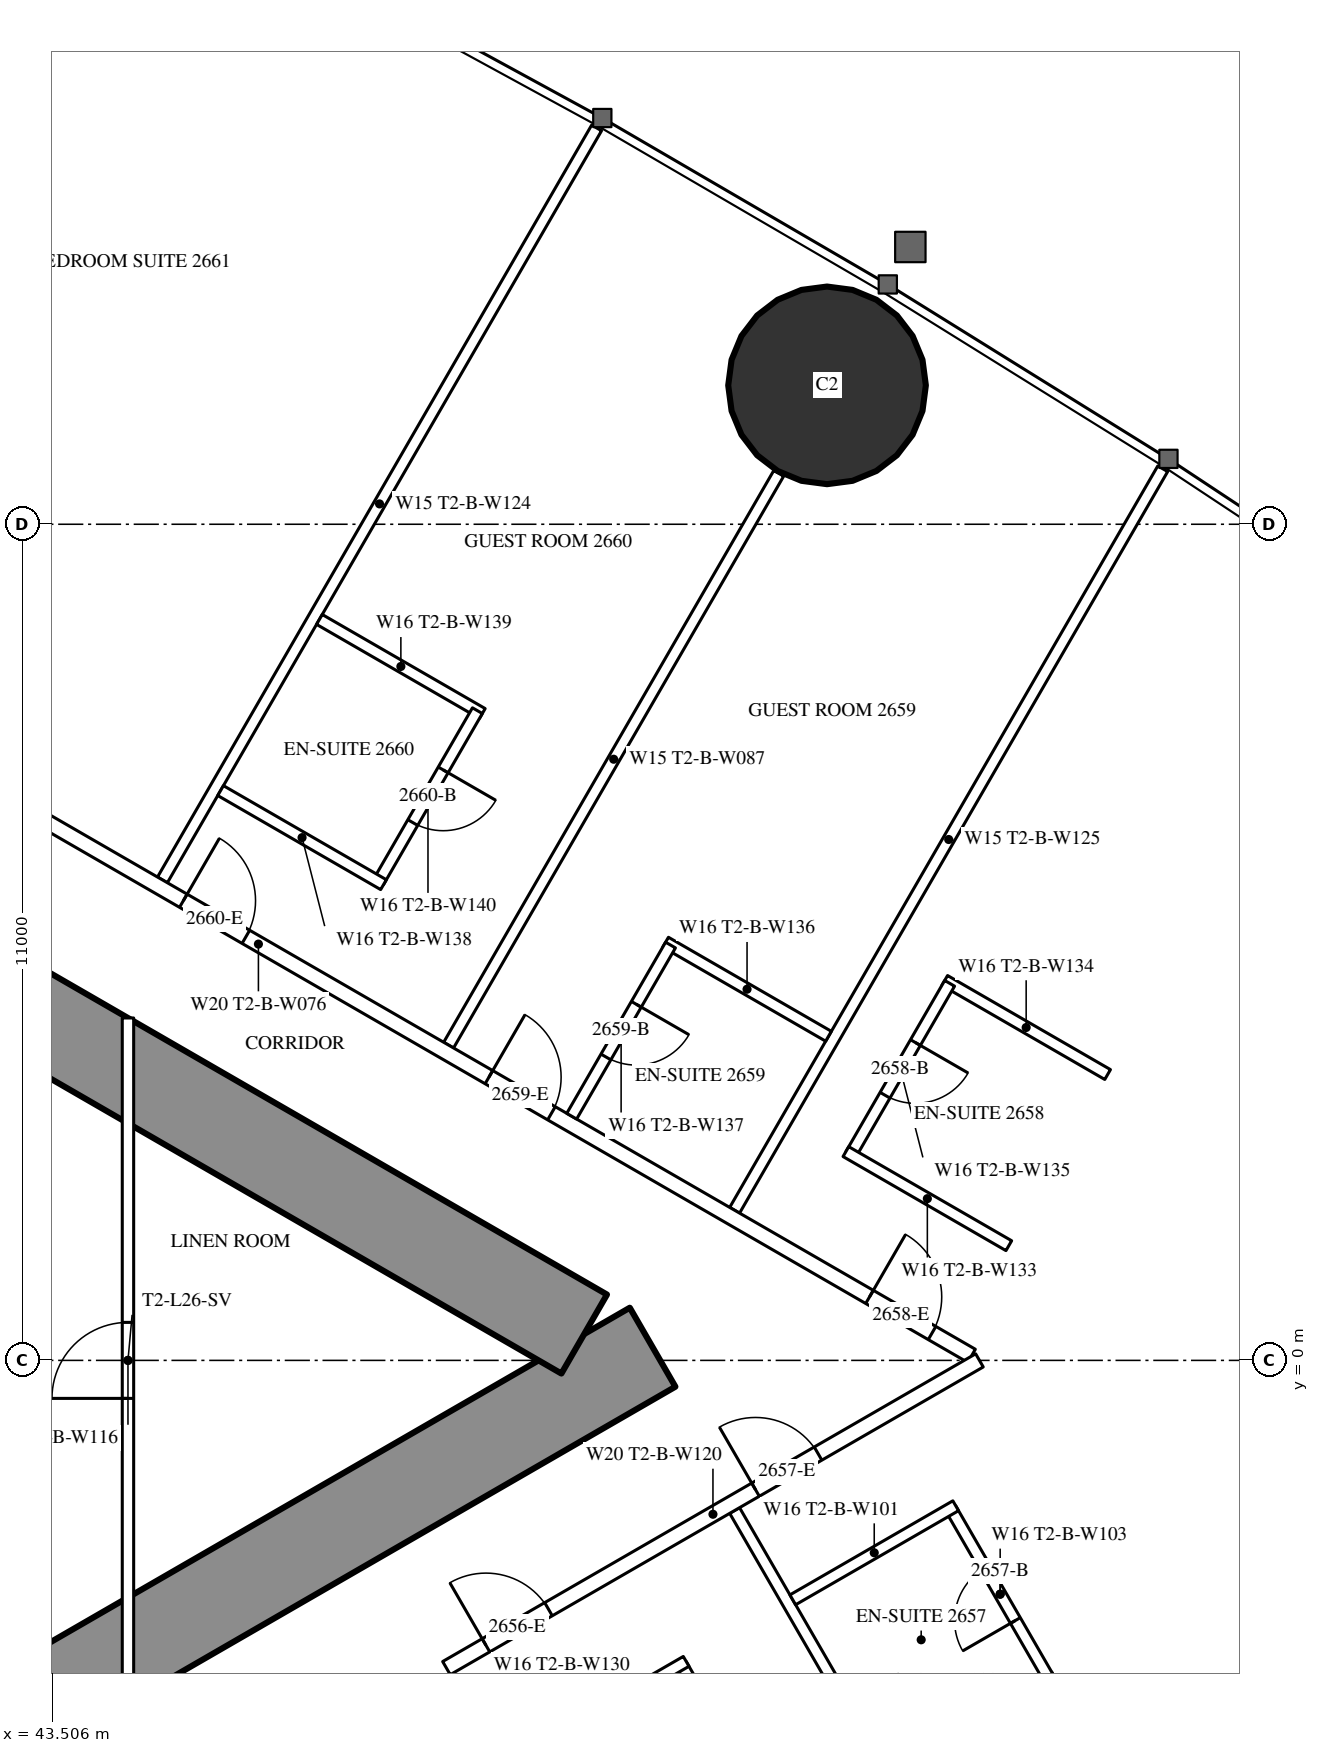
"""IFC4 building model, lengths in metres.
Left out: names, types, materials, properties, quantities, classifications, styles, units other than length and angle.
Written with IfcOpenShell. Run it as: python <this file> out.ifc"""

import sys

from ifc_helpers import new_model, si_unit, direction, frame, frame_2d, origin, origin_2d, place, context, subcontext, project, spatial, rectangle, hollow_circle, extrude, element, fill, save


model = new_model("IFC4")
c1 = context("Model", 3, precision=1e-05, world=origin(), true_north=direction((0.0, 1.0)))
c2 = subcontext(c1, "Body", "Model", "MODEL_VIEW")
j1 = project(units=[si_unit("LENGTHUNIT", "METRE"), si_unit("PLANEANGLEUNIT", "RADIAN")], contexts=[c1])
p1 = place(None, origin())
s1 = spatial("IfcSite", under=j1, at=p1, CompositionType="ELEMENT")
p2 = place(p1, origin())
s2 = spatial("IfcBuilding", under=s1, at=p2, CompositionType="ELEMENT")
p3 = place(p2, frame((0.0, 0.0, 101.1)))
s3 = spatial("IfcBuildingStorey", under=s2, at=p3, CompositionType="ELEMENT", Elevation=101.1)
p4 = place(p3, frame((53.697, 12.827, 0.0), z_axis=(0.0, 0.0, 1.0), x_axis=(1.0, 0.0, 0.0)))
e1 = element("IfcColumn", 1, at=p4, inside=s3, PredefinedType="COLUMN", context=c2, shape_type="SweptSolid", body=[
    extrude(hollow_circle(Radius=1.3, WallThickness=0.1, at=origin_2d()), origin(), (0.0, 0.0, 1.0), 3.5),
])
p5 = place(p3, frame((27.2, -13.8, 0.0), z_axis=(0.0, 0.0, 1.0), x_axis=(0.866027159892, 0.499996958321, 0.0)))
e2 = element("IfcWall", 2, at=p5, inside=s3, PredefinedType="SHEAR", context=c2, shape_type="SweptSolid", body=[
    extrude(rectangle(XDim=27.947, YDim=1.2, at=frame_2d((13.973, 0.0))), origin(), (0.0, 0.0, 1.0), 3.5),
])
p6 = place(p5, frame((4.6, 0.0, 0.0)))
e3 = element("IfcOpeningElement", 3, at=p6, cuts=e2, PredefinedType="OPENING", context=c2, shape_type="SweptSolid", body=[
    extrude(rectangle(XDim=1.0, YDim=2.2, at=frame_2d((0.5, 1.1))), frame((0.0, 0.61, 0.0), z_axis=(0.0, -1.0, 0.0), x_axis=(1.0, 0.0, 0.0)), (0.0, 0.0, 1.0), 1.22),
])
p7 = place(p5, frame((13.395, 0.0, 0.0)))
e4 = element("IfcOpeningElement", 4, at=p7, cuts=e2, PredefinedType="OPENING", context=c2, shape_type="SweptSolid", body=[
    extrude(rectangle(XDim=1.8, YDim=2.2, at=frame_2d((0.9, 1.1))), frame((0.0, 0.61, 0.0), z_axis=(0.0, -1.0, 0.0), x_axis=(1.0, 0.0, 0.0)), (0.0, 0.0, 1.0), 1.22),
])
p8 = place(p3, frame((27.2, 13.8, 0.0), z_axis=(0.0, 0.0, 1.0), x_axis=(0.866024515034, -0.500001539357, 0.0)))
e5 = element("IfcWall", 5, at=p8, inside=s3, PredefinedType="SHEAR", context=c2, shape_type="SweptSolid", body=[
    extrude(rectangle(XDim=26.907, YDim=1.2, at=frame_2d((13.454, 0.0))), origin(), (0.0, 0.0, 1.0), 3.5),
])
p9 = place(p8, frame((4.6, 0.0, 0.0)))
e6 = element("IfcOpeningElement", 6, at=p9, cuts=e5, PredefinedType="OPENING", context=c2, shape_type="SweptSolid", body=[
    extrude(rectangle(XDim=1.0, YDim=2.2, at=frame_2d((0.5, 1.1))), frame((0.0, 0.61, 0.0), z_axis=(0.0, -1.0, 0.0), x_axis=(1.0, 0.0, 0.0)), (0.0, 0.0, 1.0), 1.22),
])
p10 = place(p8, frame((13.395, 0.0, 0.0)))
e7 = element("IfcOpeningElement", 7, at=p10, cuts=e5, PredefinedType="OPENING", context=c2, shape_type="SweptSolid", body=[
    extrude(rectangle(XDim=1.8, YDim=2.2, at=frame_2d((0.9, 1.1))), frame((0.0, 0.61, 0.0), z_axis=(0.0, -1.0, 0.0), x_axis=(1.0, 0.0, 0.0)), (0.0, 0.0, 1.0), 1.22),
])
p11 = place(p3, frame((48.719, -4.147, 0.0), z_axis=(0.0, 0.0, 1.0), x_axis=(0.499990498062, -0.866030889661, 0.0)))
e8 = element("IfcWall", 8, at=p11, inside=s3, PredefinedType="PARTITIONING", context=c2, shape_type="SweptSolid", body=[
    extrude(rectangle(XDim=11.406, YDim=0.15, at=frame_2d((5.703, 0.0))), origin(), (0.0, 0.0, 1.0), 3.25),
])
p12 = place(p3, frame((52.481, -1.975, 0.0), z_axis=(0.0, 0.0, 1.0), x_axis=(0.500003867771, -0.866023170714, 0.0)))
e9 = element("IfcWall", 9, at=p12, inside=s3, PredefinedType="PARTITIONING", context=c2, shape_type="SweptSolid", body=[
    extrude(rectangle(XDim=11.265, YDim=0.15, at=frame_2d((5.632, 0.0))), origin(), (0.0, 0.0, 1.0), 3.25),
])
p13 = place(p3, frame((44.954, 6.321, 0.0), z_axis=(0.0, 0.0, 1.0), x_axis=(0.500009815811, 0.866019736549, 0.0)))
e10 = element("IfcWall", 10, at=p13, inside=s3, PredefinedType="PARTITIONING", context=c2, shape_type="SweptSolid", body=[
    extrude(rectangle(XDim=11.424, YDim=0.15, at=frame_2d((5.712, 0.0))), origin(), (0.0, 0.0, 1.0), 3.25),
])
p14 = place(p3, frame((48.719, 4.147, 0.0), z_axis=(0.0, 0.0, 1.0), x_axis=(0.499993328235, 0.866029255696, 0.0)))
e11 = element("IfcWall", 11, at=p14, inside=s3, PredefinedType="PARTITIONING", context=c2, shape_type="SweptSolid", body=[
    extrude(rectangle(XDim=8.686, YDim=0.15, at=frame_2d((4.343, 0.0))), origin(), (0.0, 0.0, 1.0), 2.2),
])
p15 = place(p3, frame((52.481, 1.975, 0.0), z_axis=(0.0, 0.0, 1.0), x_axis=(0.500003867771, 0.866023170714, 0.0)))
e12 = element("IfcWall", 12, at=p15, inside=s3, PredefinedType="PARTITIONING", context=c2, shape_type="SweptSolid", body=[
    extrude(rectangle(XDim=11.265, YDim=0.15, at=frame_2d((5.632, 0.0))), origin(), (0.0, 0.0, 1.0), 3.25),
])
p16 = place(p3, frame((36.834, 10.894, 0.0), z_axis=(0.0, 0.0, 1.0), x_axis=(0.866028157229, -0.499995230863, 0.0)))
e13 = element("IfcWall", 13, at=p16, inside=s3, PredefinedType="PARTITIONING", context=c2, shape_type="SweptSolid", body=[
    extrude(rectangle(XDim=21.667, YDim=0.2, at=frame_2d((10.833, 0.0))), origin(), (0.0, 0.0, 1.0), 3.25),
])
p17 = place(p16, frame((20.117, 0.0, 0.0)))
e14 = element("IfcOpeningElement", 14, at=p17, cuts=e13, PredefinedType="OPENING", context=c2, shape_type="SweptSolid", body=[
    extrude(rectangle(XDim=0.95, YDim=2.2, at=frame_2d((0.475, 1.1))), frame((0.0, 0.11, 0.0), z_axis=(0.0, -1.0, 0.0), x_axis=(1.0, 0.0, 0.0)), (0.0, 0.0, 1.0), 0.22),
])
p18 = place(p16, frame((14.335, 0.0, 0.0)))
e15 = element("IfcOpeningElement", 15, at=p18, cuts=e13, PredefinedType="OPENING", context=c2, shape_type="SweptSolid", body=[
    extrude(rectangle(XDim=0.95, YDim=2.2, at=frame_2d((0.475, 1.1))), frame((0.0, 0.11, 0.0), z_axis=(0.0, -1.0, 0.0), x_axis=(1.0, 0.0, 0.0)), (0.0, 0.0, 1.0), 0.22),
])
p19 = place(p16, frame((9.693, 0.0, 0.0)))
e16 = element("IfcOpeningElement", 16, at=p19, cuts=e13, PredefinedType="OPENING", context=c2, shape_type="SweptSolid", body=[
    extrude(rectangle(XDim=0.95, YDim=2.2, at=frame_2d((0.475, 1.1))), frame((0.0, 0.11, 0.0), z_axis=(0.0, -1.0, 0.0), x_axis=(1.0, 0.0, 0.0)), (0.0, 0.0, 1.0), 0.22),
])
p20 = place(p16, frame((2.95, 0.0, 0.0)))
e17 = element("IfcOpeningElement", 17, at=p20, cuts=e13, PredefinedType="OPENING", context=c2, shape_type="SweptSolid", body=[
    extrude(rectangle(XDim=0.95, YDim=2.2, at=frame_2d((0.475, 1.1))), frame((0.0, 0.11, 0.0), z_axis=(0.0, -1.0, 0.0), x_axis=(1.0, 0.0, 0.0)), (0.0, 0.0, 1.0), 0.22),
])
p21 = place(p3, frame((48.69, -4.048, 0.0), z_axis=(0.0, 0.0, 1.0), x_axis=(0.866026410209, 0.499998256818, 0.0)))
e18 = element("IfcWall", 18, at=p21, inside=s3, PredefinedType="PARTITIONING", context=c2, shape_type="SweptSolid", body=[
    extrude(rectangle(XDim=8.097, YDim=0.2, at=frame_2d((4.048, 0.0))), origin(), (0.0, 0.0, 1.0), 3.25),
])
p22 = place(p21, frame((0.6, 0.0, 0.0)))
e19 = element("IfcOpeningElement", 19, at=p22, cuts=e18, PredefinedType="OPENING", context=c2, shape_type="SweptSolid", body=[
    extrude(rectangle(XDim=0.95, YDim=2.2, at=frame_2d((0.475, 1.1))), frame((0.0, 0.11, 0.0), z_axis=(0.0, -1.0, 0.0), x_axis=(1.0, 0.0, 0.0)), (0.0, 0.0, 1.0), 0.22),
])
p23 = place(p21, frame((4.695, 0.0, 0.0)))
e20 = element("IfcOpeningElement", 20, at=p23, cuts=e18, PredefinedType="OPENING", context=c2, shape_type="SweptSolid", body=[
    extrude(rectangle(XDim=0.95, YDim=2.2, at=frame_2d((0.475, 1.1))), frame((0.0, 0.11, 0.0), z_axis=(0.0, -1.0, 0.0), x_axis=(1.0, 0.0, 0.0)), (0.0, 0.0, 1.0), 0.22),
])
p24 = place(p3, frame((51.778, -3.998, 0.0), z_axis=(0.0, 0.0, 1.0), x_axis=(0.500047596559, -0.865997922154, 0.0)))
e21 = element("IfcWall", 21, at=p24, inside=s3, PredefinedType="PARTITIONING", context=c2, shape_type="SweptSolid", body=[
    extrude(rectangle(XDim=2.6, YDim=0.15, at=frame_2d((1.3, 0.0))), origin(), (0.0, 0.0, 1.0), 3.25),
])
p25 = place(p24, frame((0.9, 0.0, 0.0)))
e22 = element("IfcOpeningElement", 22, at=p25, cuts=e21, PredefinedType="OPENING", context=c2, shape_type="SweptSolid", body=[
    extrude(rectangle(XDim=0.8, YDim=2.2, at=frame_2d((0.4, 1.1))), frame((0.0, 0.085, 0.0), z_axis=(0.0, -1.0, 0.0), x_axis=(1.0, 0.0, 0.0)), (0.0, 0.0, 1.0), 0.17),
])
for number, where, z_axis, x_axis in (
    (23, (49.7, -5.198, 0.0), (0.0, 0.0, 1.0), (0.866, 0.5, 0.0)),
    (24, (54.546, -5.402, 0.0), (0.0, 0.0, 1.0), (0.866, 0.5, 0.0)),
):
    element("IfcWall", number, at=place(p3, frame(where, z_axis=z_axis, x_axis=x_axis)), inside=s3, PredefinedType="PARTITIONING", context=c2, shape_type="SweptSolid", body=[
        extrude(rectangle(XDim=2.475, YDim=0.15, at=frame_2d((1.237, 0.0))), origin(), (0.0, 0.0, 1.0), 3.25),
    ])
p26 = place(p3, frame((55.325, -1.95, 0.0), z_axis=(0.0, 0.0, 1.0), x_axis=(0.500006934395, -0.866021400173, 0.0)))
e25 = element("IfcWall", 25, at=p26, inside=s3, PredefinedType="PARTITIONING", context=c2, shape_type="SweptSolid", body=[
    extrude(rectangle(XDim=2.6, YDim=0.15, at=frame_2d((1.3, 0.0))), origin(), (0.0, 0.0, 1.0), 3.25),
])
p27 = place(p26, frame((0.9, 0.0, 0.0)))
e26 = element("IfcOpeningElement", 26, at=p27, cuts=e25, PredefinedType="OPENING", context=c2, shape_type="SweptSolid", body=[
    extrude(rectangle(XDim=0.8, YDim=2.2, at=frame_2d((0.4, 1.1))), frame((0.0, 0.085, 0.0), z_axis=(0.0, -1.0, 0.0), x_axis=(1.0, 0.0, 0.0)), (0.0, 0.0, 1.0), 0.17),
])
for number, where, z_axis, x_axis in (
    (27, (53.246, -3.15, 0.0), (0.0, 0.0, 1.0), (0.866, 0.5, 0.0)),
    (28, (55.245, 4.998, 0.0), (0.0, 0.0, 1.0), (0.866, -0.5, 0.0)),
):
    element("IfcWall", number, at=place(p3, frame(where, z_axis=z_axis, x_axis=x_axis)), inside=s3, PredefinedType="PARTITIONING", context=c2, shape_type="SweptSolid", body=[
        extrude(rectangle(XDim=2.475, YDim=0.15, at=frame_2d((1.237, 0.0))), origin(), (0.0, 0.0, 1.0), 3.25),
    ])
p28 = place(p3, frame((54.01, 2.709, 0.0), z_axis=(0.0, 0.0, 1.0), x_axis=(0.500006934395, 0.866021400173, 0.0)))
e29 = element("IfcWall", 29, at=p28, inside=s3, PredefinedType="PARTITIONING", context=c2, shape_type="SweptSolid", body=[
    extrude(rectangle(XDim=2.6, YDim=0.15, at=frame_2d((1.3, 0.0))), origin(), (0.0, 0.0, 1.0), 3.25),
])
p29 = place(p28, frame((0.9, 0.0, 0.0)))
e30 = element("IfcOpeningElement", 30, at=p29, cuts=e29, PredefinedType="OPENING", context=c2, shape_type="SweptSolid", body=[
    extrude(rectangle(XDim=0.8, YDim=2.2, at=frame_2d((0.4, 1.1))), frame((0.0, 0.085, 0.0), z_axis=(0.0, -1.0, 0.0), x_axis=(1.0, 0.0, 0.0)), (0.0, 0.0, 1.0), 0.17),
])
p30 = place(p3, frame((53.945, 2.747, 0.0), z_axis=(0.0, 0.0, 1.0), x_axis=(0.866031185235, -0.4999899861, 0.0)))
e31 = element("IfcWall", 31, at=p30, inside=s3, PredefinedType="PARTITIONING", context=c2, shape_type="SweptSolid", body=[
    extrude(rectangle(XDim=2.475, YDim=0.15, at=frame_2d((1.238, 0.0))), origin(), (0.0, 0.0, 1.0), 3.25),
])
p31 = place(p3, frame((51.573, 5.502, 0.0), z_axis=(0.0, 0.0, 1.0), x_axis=(0.866006523861, -0.500032699561, 0.0)))
e32 = element("IfcWall", 32, at=p31, inside=s3, PredefinedType="PARTITIONING", context=c2, shape_type="SweptSolid", body=[
    extrude(rectangle(XDim=2.475, YDim=0.15, at=frame_2d((1.237, 0.0))), origin(), (0.0, 0.0, 1.0), 3.25),
])
p32 = place(p3, frame((50.338, 3.213, 0.0), z_axis=(0.0, 0.0, 1.0), x_axis=(0.500047596559, 0.865997922154, 0.0)))
e33 = element("IfcWall", 33, at=p32, inside=s3, PredefinedType="PARTITIONING", context=c2, shape_type="SweptSolid", body=[
    extrude(rectangle(XDim=2.6, YDim=0.15, at=frame_2d((1.3, 0.0))), origin(), (0.0, 0.0, 1.0), 3.25),
])
p33 = place(p32, frame((0.9, 0.0, 0.0)))
e34 = element("IfcOpeningElement", 34, at=p33, cuts=e33, PredefinedType="OPENING", context=c2, shape_type="SweptSolid", body=[
    extrude(rectangle(XDim=0.8, YDim=2.2, at=frame_2d((0.4, 1.1))), frame((0.0, 0.085, 0.0), z_axis=(0.0, -1.0, 0.0), x_axis=(1.0, 0.0, 0.0)), (0.0, 0.0, 1.0), 0.17),
])
p34 = place(p3, frame((47.019, 9.748, 0.0), z_axis=(0.0, 0.0, 1.0), x_axis=(0.866006523861, -0.500032699561, 0.0)))
e35 = element("IfcWall", 35, at=p34, inside=s3, PredefinedType="PARTITIONING", context=c2, shape_type="SweptSolid", body=[
    extrude(rectangle(XDim=2.475, YDim=0.15, at=frame_2d((1.237, 0.0))), origin(), (0.0, 0.0, 1.0), 3.25),
])
p35 = place(p3, frame((47.797, 6.296, 0.0), z_axis=(0.0, 0.0, 1.0), x_axis=(0.499936506574, 0.866062058628, 0.0)))
e36 = element("IfcWall", 36, at=p35, inside=s3, PredefinedType="PARTITIONING", context=c2, shape_type="SweptSolid", body=[
    extrude(rectangle(XDim=2.6, YDim=0.15, at=frame_2d((1.3, 0.0))), origin(), (0.0, 0.0, 1.0), 3.25),
])
p36 = place(p35, frame((0.9, 0.0, 0.0)))
e37 = element("IfcOpeningElement", 37, at=p36, cuts=e36, PredefinedType="OPENING", context=c2, shape_type="SweptSolid", body=[
    extrude(rectangle(XDim=0.8, YDim=2.2, at=frame_2d((0.4, 1.1))), frame((0.0, 0.085, 0.0), z_axis=(0.0, -1.0, 0.0), x_axis=(1.0, 0.0, 0.0)), (0.0, 0.0, 1.0), 0.17),
])
p37 = place(p3, frame((45.719, 7.496, 0.0), z_axis=(0.0, 0.0, 1.0), x_axis=(0.866031185235, -0.4999899861, 0.0)))
e38 = element("IfcWall", 38, at=p37, inside=s3, PredefinedType="PARTITIONING", context=c2, shape_type="SweptSolid", body=[
    extrude(rectangle(XDim=2.475, YDim=0.15, at=frame_2d((1.238, 0.0))), origin(), (0.0, 0.0, 1.0), 3.25),
])
p38 = place(p3, frame((44.5, -4.505, 0.0), z_axis=(0.0, 0.0, 1.0), x_axis=(0.0, 1.0, 0.0)))
e39 = element("IfcWall", 39, at=p38, inside=s3, PredefinedType="PARTITIONING", context=c2, shape_type="SweptSolid", body=[
    extrude(rectangle(XDim=9.009, YDim=0.15, at=frame_2d((4.505, 0.0))), origin(), (0.0, 0.0, 1.0), 2.45),
])
p39 = place(p38, frame((4.005, 0.0, 0.0)))
e40 = element("IfcOpeningElement", 40, at=p39, cuts=e39, PredefinedType="OPENING", context=c2, shape_type="SweptSolid", body=[
    extrude(rectangle(XDim=1.0, YDim=2.2, at=frame_2d((0.5, 1.1))), frame((0.0, 0.085, 0.0), z_axis=(0.0, -1.0, 0.0), x_axis=(1.0, 0.0, 0.0)), (0.0, 0.0, 1.0), 0.17),
])
p40 = place(p22, origin())
e41 = element("IfcDoor", 41, at=p40, inside=s3, OperationType="SINGLE_SWING_LEFT", PredefinedType="DOOR", context=c2, shape_type="SweptSolid", body=[
    extrude(rectangle(XDim=0.95, YDim=2.2, at=frame_2d((0.475, 1.1))), frame((0.0, 0.025, 0.0), z_axis=(0.0, -1.0, 0.0), x_axis=(1.0, 0.0, 0.0)), (0.0, 0.0, 1.0), 0.05),
])
fill(e19, e41)
p41 = place(p27, origin())
e42 = element("IfcDoor", 42, at=p41, inside=s3, OperationType="SINGLE_SWING_RIGHT", PredefinedType="DOOR", context=c2, shape_type="SweptSolid", body=[
    extrude(rectangle(XDim=0.8, YDim=2.2, at=frame_2d((0.4, 1.1))), frame((0.0, 0.025, 0.0), z_axis=(0.0, -1.0, 0.0), x_axis=(1.0, 0.0, 0.0)), (0.0, 0.0, 1.0), 0.05),
])
fill(e26, e42)
p42 = place(p23, origin())
e43 = element("IfcDoor", 43, at=p42, inside=s3, OperationType="SINGLE_SWING_LEFT", PredefinedType="DOOR", context=c2, shape_type="SweptSolid", body=[
    extrude(rectangle(XDim=0.95, YDim=2.2, at=frame_2d((0.475, 1.1))), frame((0.0, 0.025, 0.0), z_axis=(0.0, -1.0, 0.0), x_axis=(1.0, 0.0, 0.0)), (0.0, 0.0, 1.0), 0.05),
])
fill(e20, e43)
p43 = place(p29, origin())
e44 = element("IfcDoor", 44, at=p43, inside=s3, OperationType="SINGLE_SWING_RIGHT", PredefinedType="DOOR", context=c2, shape_type="SweptSolid", body=[
    extrude(rectangle(XDim=0.8, YDim=2.2, at=frame_2d((0.4, 1.1))), frame((0.0, 0.025, 0.0), z_axis=(0.0, -1.0, 0.0), x_axis=(1.0, 0.0, 0.0)), (0.0, 0.0, 1.0), 0.05),
])
fill(e30, e44)
p44 = place(p17, origin())
e45 = element("IfcDoor", 45, at=p44, inside=s3, OperationType="SINGLE_SWING_LEFT", PredefinedType="DOOR", context=c2, shape_type="SweptSolid", body=[
    extrude(rectangle(XDim=0.95, YDim=2.2, at=frame_2d((0.475, 1.1))), frame((0.0, 0.025, 0.0), z_axis=(0.0, -1.0, 0.0), x_axis=(1.0, 0.0, 0.0)), (0.0, 0.0, 1.0), 0.05),
])
fill(e14, e45)
p45 = place(p33, origin())
e46 = element("IfcDoor", 46, at=p45, inside=s3, OperationType="SINGLE_SWING_RIGHT", PredefinedType="DOOR", context=c2, shape_type="SweptSolid", body=[
    extrude(rectangle(XDim=0.8, YDim=2.2, at=frame_2d((0.4, 1.1))), frame((0.0, 0.025, 0.0), z_axis=(0.0, -1.0, 0.0), x_axis=(1.0, 0.0, 0.0)), (0.0, 0.0, 1.0), 0.05),
])
fill(e34, e46)
p46 = place(p18, origin())
e47 = element("IfcDoor", 47, at=p46, inside=s3, OperationType="SINGLE_SWING_LEFT", PredefinedType="DOOR", context=c2, shape_type="SweptSolid", body=[
    extrude(rectangle(XDim=0.95, YDim=2.2, at=frame_2d((0.475, 1.1))), frame((0.0, 0.025, 0.0), z_axis=(0.0, -1.0, 0.0), x_axis=(1.0, 0.0, 0.0)), (0.0, 0.0, 1.0), 0.05),
])
fill(e15, e47)
p47 = place(p36, origin())
e48 = element("IfcDoor", 48, at=p47, inside=s3, OperationType="SINGLE_SWING_RIGHT", PredefinedType="DOOR", context=c2, shape_type="SweptSolid", body=[
    extrude(rectangle(XDim=0.8, YDim=2.2, at=frame_2d((0.4, 1.1))), frame((0.0, 0.025, 0.0), z_axis=(0.0, -1.0, 0.0), x_axis=(1.0, 0.0, 0.0)), (0.0, 0.0, 1.0), 0.05),
])
fill(e37, e48)
p48 = place(p19, origin())
e49 = element("IfcDoor", 49, at=p48, inside=s3, OperationType="SINGLE_SWING_LEFT", PredefinedType="DOOR", context=c2, shape_type="SweptSolid", body=[
    extrude(rectangle(XDim=0.95, YDim=2.2, at=frame_2d((0.475, 1.1))), frame((0.0, 0.025, 0.0), z_axis=(0.0, -1.0, 0.0), x_axis=(1.0, 0.0, 0.0)), (0.0, 0.0, 1.0), 0.05),
])
fill(e16, e49)
p49 = place(p39, origin())
e50 = element("IfcDoor", 50, at=p49, inside=s3, OperationType="SINGLE_SWING_LEFT", PredefinedType="DOOR", context=c2, shape_type="SweptSolid", body=[
    extrude(rectangle(XDim=1.0, YDim=2.2, at=frame_2d((0.5, 1.1))), frame((0.0, 0.025, 0.0), z_axis=(0.0, -1.0, 0.0), x_axis=(1.0, 0.0, 0.0)), (0.0, 0.0, 1.0), 0.05),
])
fill(e40, e50)
save(model, sys.argv[1])
